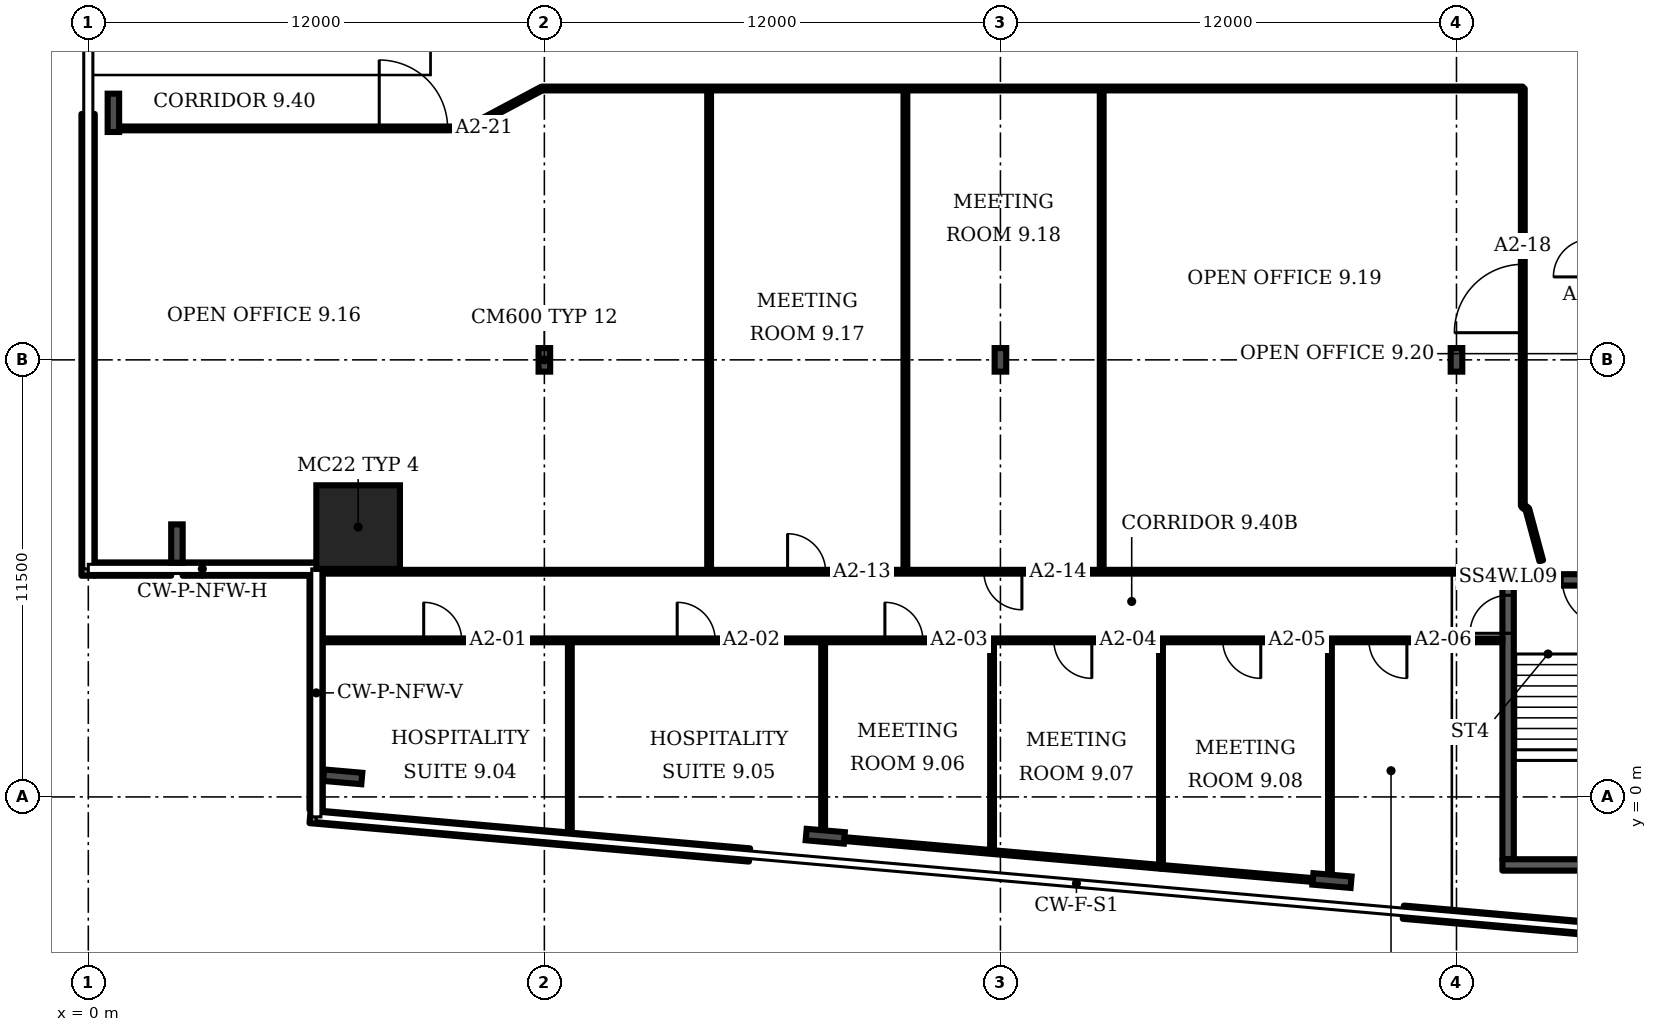
"""IFC4 building model, lengths in metres.
Left out: names, types, materials, properties, quantities, classifications, styles, units other than length and angle.
Written with IfcOpenShell. Run it as: python <this file> out.ifc"""

import sys

from ifc_helpers import new_model, si_unit, direction, frame, frame_2d, origin, origin_2d, place, context, subcontext, project, spatial, rectangle, i_section, extrude, element, fill, save


model = new_model("IFC4")
c1 = context("Model", 3, precision=1e-05, world=origin(), true_north=direction((0.0, 1.0)))
c2 = subcontext(c1, "Body", "Model", "MODEL_VIEW")
j1 = project(units=[si_unit("LENGTHUNIT", "METRE"), si_unit("PLANEANGLEUNIT", "RADIAN")], contexts=[c1])
p1 = place(None, origin())
s1 = spatial("IfcSite", under=j1, at=p1, CompositionType="ELEMENT")
p2 = place(p1, origin())
s2 = spatial("IfcBuilding", under=s1, at=p2, CompositionType="ELEMENT")
p3 = place(p2, frame((0.0, 0.0, 52.3)))
s3 = spatial("IfcBuildingStorey", under=s2, at=p3, CompositionType="ELEMENT", Elevation=52.3)
p4 = place(p3, frame((7.1, 7.1, 0.0), z_axis=(0.0, 0.0, 1.0), x_axis=(1.0, 0.0, 0.0)))
e1 = element("IfcColumn", 1, at=p4, inside=s3, PredefinedType="COLUMN", context=c2, shape_type="SweptSolid", body=[
    extrude(rectangle(XDim=2.2, YDim=2.2, at=origin_2d()), origin(), (0.0, 0.0, 1.0), 3.6),
])
for number, where, z_axis, x_axis in (
    (2, (6.694, 0.529, 0.0), (0.0, 0.0, 1.0), (-0.087, -0.996, 0.0)),
    (3, (19.391, -1.034, 0.0), (0.0, 0.0, 1.0), (-0.087, -0.996, 0.0)),
    (4, (32.724, -2.2, 0.0), (0.0, 0.0, 1.0), (-0.087, -0.996, 0.0)),
    (5, (0.66, 18.0, 0.0), (0.0, 0.0, 1.0), (-1.0, 0.0, 0.0)),
    (6, (2.332, 6.667, 0.0), (0.0, 0.0, 1.0), (-1.0, 0.0, 0.0)),
):
    element("IfcColumn", number, at=place(p3, frame(where, z_axis=z_axis, x_axis=x_axis)), inside=s3, PredefinedType="COLUMN", context=c2, shape_type="SweptSolid", body=[
        extrude(i_section(OverallWidth=0.302, OverallDepth=1.008, WebThickness=0.021, FlangeThickness=0.04, FilletRadius=0.03, at=origin_2d()), origin(), (0.0, 0.0, 1.0), 3.6),
    ])
for number, where, z_axis, x_axis in (
    (7, (12.0, 11.5, 0.0), (0.0, 0.0, 1.0), (1.0, 0.0, 0.0)),
    (8, (24.0, 11.5, 0.0), (0.0, 0.0, 1.0), (1.0, 0.0, 0.0)),
    (9, (36.0, 11.5, 0.0), (0.0, 0.0, 1.0), (1.0, 0.0, 0.0)),
):
    element("IfcColumn", number, at=place(p3, frame(where, z_axis=z_axis, x_axis=x_axis)), inside=s3, PredefinedType="COLUMN", context=c2, shape_type="SweptSolid", body=[
        extrude(i_section(OverallWidth=0.305, OverallDepth=0.62, WebThickness=0.021, FlangeThickness=0.04, FilletRadius=0.027, at=origin_2d()), origin(), (0.0, 0.0, 1.0), 3.6),
    ])
p5 = place(p3, frame((5.835, -0.516, 0.0), z_axis=(0.0, 0.0, 1.0), x_axis=(0.996192, -0.087142, 0.0)))
e10 = element("IfcWall", 10, at=p5, inside=s3, PredefinedType="SOLIDWALL", context=c2, shape_type="SweptSolid", body=[
    extrude(rectangle(XDim=11.607, YDim=0.35, at=frame_2d((5.804, 0.0))), origin(), (0.0, 0.0, 1.0), 1.0),
])
p6 = place(p3, frame((34.601, -3.032, 0.0), z_axis=(0.0, 0.0, 1.0), x_axis=(0.996193, -0.087148, 0.0)))
e11 = element("IfcWall", 11, at=p6, inside=s3, PredefinedType="SOLIDWALL", context=c2, shape_type="SweptSolid", body=[
    extrude(rectangle(XDim=11.458, YDim=0.35, at=frame_2d((5.729, 0.0))), origin(), (0.0, 0.0, 1.0), 1.0),
])
p7 = place(p3, frame((-0.005, 17.97, 0.0), z_axis=(0.0, 0.0, 1.0), x_axis=(0.0, -1.0, 0.0)))
e12 = element("IfcWall", 12, at=p7, inside=s3, PredefinedType="SOLIDWALL", context=c2, shape_type="SweptSolid", body=[
    extrude(rectangle(XDim=12.15, YDim=0.35, at=frame_2d((6.075, 0.0))), origin(), (0.0, 0.0, 1.0), 1.0),
])
p8 = place(p3, frame((0.17, 5.995, 0.0), z_axis=(0.0, 0.0, 1.0), x_axis=(1.0, 0.0, 0.0)))
e13 = element("IfcWall", 13, at=p8, inside=s3, PredefinedType="SOLIDWALL", context=c2, shape_type="SweptSolid", body=[
    extrude(rectangle(XDim=2.011, YDim=0.35, at=frame_2d((1.005, 0.0))), origin(), (0.0, 0.0, 1.0), 1.0),
])
p9 = place(p3, frame((2.483, 5.995, 0.0), z_axis=(0.0, 0.0, 1.0), x_axis=(1.0, 0.0, 0.0)))
e14 = element("IfcWall", 14, at=p9, inside=s3, PredefinedType="SOLIDWALL", context=c2, shape_type="SweptSolid", body=[
    extrude(rectangle(XDim=3.517, YDim=0.35, at=frame_2d((1.759, 0.0))), origin(), (0.0, 0.0, 1.0), 1.0),
])
p10 = place(p3, frame((5.995, 5.82, 0.0), z_axis=(0.0, 0.0, 1.0), x_axis=(0.0, -1.0, 0.0)))
e15 = element("IfcWall", 15, at=p10, inside=s3, PredefinedType="SOLIDWALL", context=c2, shape_type="SweptSolid", body=[
    extrude(rectangle(XDim=6.161, YDim=0.35, at=frame_2d((3.081, 0.0))), origin(), (0.0, 0.0, 1.0), 1.0),
])
p11 = place(p3, frame((37.208, 5.711, 0.0), z_axis=(0.0, 0.0, 1.0), x_axis=(1.0, 0.0, 0.0)))
e16 = element("IfcWall", 16, at=p11, inside=s3, PredefinedType="SHEAR", context=c2, shape_type="SweptSolid", body=[
    extrude(rectangle(XDim=4.35, YDim=0.3, at=frame_2d((2.175, 0.0))), origin(), (0.0, 0.0, 1.0), 3.2),
])
p12 = place(p11, frame((1.575, 0.0, 0.0)))
e17 = element("IfcOpeningElement", 17, at=p12, cuts=e16, PredefinedType="OPENING", context=c2, shape_type="SweptSolid", body=[
    extrude(rectangle(XDim=1.2, YDim=2.1, at=frame_2d((0.6, 1.05))), frame((0.0, 0.16, 0.0), z_axis=(0.0, -1.0, 0.0), x_axis=(1.0, 0.0, 0.0)), (0.0, 0.0, 1.0), 0.32),
])
p13 = place(p3, frame((37.358, -1.639, 0.0), z_axis=(0.0, 0.0, 1.0), x_axis=(0.0, 1.0, 0.0)))
e18 = element("IfcWall", 18, at=p13, inside=s3, PredefinedType="SHEAR", context=c2, shape_type="SweptSolid", body=[
    extrude(rectangle(XDim=7.2, YDim=0.3, at=frame_2d((3.6, 0.0))), origin(), (0.0, 0.0, 1.0), 3.2),
])
p14 = place(p13, frame((5.945, 0.0, 0.0)))
e19 = element("IfcOpeningElement", 19, at=p14, cuts=e18, PredefinedType="OPENING", context=c2, shape_type="SweptSolid", body=[
    extrude(rectangle(XDim=1.0, YDim=2.1, at=frame_2d((0.5, 1.05))), frame((0.0, 0.16, 0.0), z_axis=(0.0, -1.0, 0.0), x_axis=(1.0, 0.0, 0.0)), (0.0, 0.0, 1.0), 0.32),
])
p15 = place(p3, frame((0.63, 17.59, 0.0), z_axis=(0.0, 0.0, 1.0), x_axis=(1.0, 0.0, 0.0)))
e20 = element("IfcWall", 20, at=p15, inside=s3, PredefinedType="PARTITIONING", context=c2, shape_type="SweptSolid", body=[
    extrude(rectangle(XDim=9.55, YDim=0.1, at=frame_2d((4.775, 0.0))), origin(), (0.0, 0.0, 1.0), 3.2),
])
p16 = place(p15, frame((7.025, 0.0, 0.0)))
e21 = element("IfcOpeningElement", 21, at=p16, cuts=e20, PredefinedType="OPENING", context=c2, shape_type="SweptSolid", body=[
    extrude(rectangle(XDim=1.8, YDim=2.1, at=frame_2d((0.9, 1.05))), frame((0.0, 0.06, 0.0), z_axis=(0.0, -1.0, 0.0), x_axis=(1.0, 0.0, 0.0)), (0.0, 0.0, 1.0), 0.12),
])
p17 = place(p3, frame((6.02, 4.12, 0.0), z_axis=(0.0, 0.0, 1.0), x_axis=(1.0, 0.0, 0.0)))
e22 = element("IfcWall", 22, at=p17, inside=s3, PredefinedType="PARTITIONING", context=c2, shape_type="SweptSolid", body=[
    extrude(rectangle(XDim=31.188, YDim=0.1, at=frame_2d((15.594, 0.0))), origin(), (0.0, 0.0, 1.0), 3.2),
])
p18 = place(p17, frame((2.805, 0.0, 0.0)))
e23 = element("IfcOpeningElement", 23, at=p18, cuts=e22, PredefinedType="OPENING", context=c2, shape_type="SweptSolid", body=[
    extrude(rectangle(XDim=1.0, YDim=2.1, at=frame_2d((0.5, 1.05))), frame((0.0, 0.06, 0.0), z_axis=(0.0, -1.0, 0.0), x_axis=(1.0, 0.0, 0.0)), (0.0, 0.0, 1.0), 0.12),
])
p19 = place(p17, frame((9.475, 0.0, 0.0)))
e24 = element("IfcOpeningElement", 24, at=p19, cuts=e22, PredefinedType="OPENING", context=c2, shape_type="SweptSolid", body=[
    extrude(rectangle(XDim=1.0, YDim=2.1, at=frame_2d((0.5, 1.05))), frame((0.0, 0.06, 0.0), z_axis=(0.0, -1.0, 0.0), x_axis=(1.0, 0.0, 0.0)), (0.0, 0.0, 1.0), 0.12),
])
p20 = place(p17, frame((14.94, 0.0, 0.0)))
e25 = element("IfcOpeningElement", 25, at=p20, cuts=e22, PredefinedType="OPENING", context=c2, shape_type="SweptSolid", body=[
    extrude(rectangle(XDim=1.0, YDim=2.1, at=frame_2d((0.5, 1.05))), frame((0.0, 0.06, 0.0), z_axis=(0.0, -1.0, 0.0), x_axis=(1.0, 0.0, 0.0)), (0.0, 0.0, 1.0), 0.12),
])
p21 = place(p17, frame((19.385, 0.0, 0.0)))
e26 = element("IfcOpeningElement", 26, at=p21, cuts=e22, PredefinedType="OPENING", context=c2, shape_type="SweptSolid", body=[
    extrude(rectangle(XDim=1.0, YDim=2.1, at=frame_2d((0.5, 1.05))), frame((0.0, 0.06, 0.0), z_axis=(0.0, -1.0, 0.0), x_axis=(1.0, 0.0, 0.0)), (0.0, 0.0, 1.0), 0.12),
])
p22 = place(p17, frame((23.83, 0.0, 0.0)))
e27 = element("IfcOpeningElement", 27, at=p22, cuts=e22, PredefinedType="OPENING", context=c2, shape_type="SweptSolid", body=[
    extrude(rectangle(XDim=1.0, YDim=2.1, at=frame_2d((0.5, 1.05))), frame((0.0, 0.06, 0.0), z_axis=(0.0, -1.0, 0.0), x_axis=(1.0, 0.0, 0.0)), (0.0, 0.0, 1.0), 0.12),
])
p23 = place(p17, frame((27.675, 0.0, 0.0)))
e28 = element("IfcOpeningElement", 28, at=p23, cuts=e22, PredefinedType="OPENING", context=c2, shape_type="SweptSolid", body=[
    extrude(rectangle(XDim=1.0, YDim=2.1, at=frame_2d((0.5, 1.05))), frame((0.0, 0.06, 0.0), z_axis=(0.0, -1.0, 0.0), x_axis=(1.0, 0.0, 0.0)), (0.0, 0.0, 1.0), 0.12),
])
p24 = place(p3, frame((6.02, 5.925, 0.0), z_axis=(0.0, 0.0, 1.0), x_axis=(1.0, 0.0, 0.0)))
e29 = element("IfcWall", 29, at=p24, inside=s3, PredefinedType="PARTITIONING", context=c2, shape_type="SweptSolid", body=[
    extrude(rectangle(XDim=32.21, YDim=0.1, at=frame_2d((16.105, 0.0))), origin(), (0.0, 0.0, 1.0), 3.2),
])
p25 = place(p24, frame((12.38, 0.0, 0.0)))
e30 = element("IfcOpeningElement", 30, at=p25, cuts=e29, PredefinedType="OPENING", context=c2, shape_type="SweptSolid", body=[
    extrude(rectangle(XDim=1.0, YDim=2.1, at=frame_2d((0.5, 1.05))), frame((0.0, 0.06, 0.0), z_axis=(0.0, -1.0, 0.0), x_axis=(1.0, 0.0, 0.0)), (0.0, 0.0, 1.0), 0.12),
])
p26 = place(p24, frame((17.545, 0.0, 0.0)))
e31 = element("IfcOpeningElement", 31, at=p26, cuts=e29, PredefinedType="OPENING", context=c2, shape_type="SweptSolid", body=[
    extrude(rectangle(XDim=1.0, YDim=2.1, at=frame_2d((0.5, 1.05))), frame((0.0, 0.06, 0.0), z_axis=(0.0, -1.0, 0.0), x_axis=(1.0, 0.0, 0.0)), (0.0, 0.0, 1.0), 0.12),
])
p27 = place(p3, frame((10.18, 17.59, 0.0), z_axis=(0.0, 0.0, 1.0), x_axis=(0.435266, 0.900306, 0.0)))
e32 = element("IfcWall", 32, at=p27, inside=s3, PredefinedType="PARTITIONING", context=c2, shape_type="SweptSolid", body=[
    extrude(rectangle(XDim=0.172, YDim=0.1, at=frame_2d((0.086, 0.0))), origin(), (0.0, 0.0, 1.0), 3.2),
])
p28 = place(p3, frame((10.255, 17.745, 0.0), z_axis=(0.0, 0.0, 1.0), x_axis=(0.882644, 0.470051, 0.0)))
e33 = element("IfcWall", 33, at=p28, inside=s3, PredefinedType="PARTITIONING", context=c2, shape_type="SweptSolid", body=[
    extrude(rectangle(XDim=1.904, YDim=0.1, at=frame_2d((0.952, 0.0))), origin(), (0.0, 0.0, 1.0), 3.2),
])
p29 = place(p3, frame((11.935, 18.64, 0.0), z_axis=(0.0, 0.0, 1.0), x_axis=(1.0, 0.0, 0.0)))
e34 = element("IfcWall", 34, at=p29, inside=s3, PredefinedType="PARTITIONING", context=c2, shape_type="SweptSolid", body=[
    extrude(rectangle(XDim=25.81, YDim=0.1, at=frame_2d((12.905, 0.0))), origin(), (0.0, 0.0, 1.0), 3.2),
])
p30 = place(p3, frame((12.67, -1.088, 0.0), z_axis=(0.0, 0.0, 1.0), x_axis=(0.0, 1.0, 0.0)))
e35 = element("IfcWall", 35, at=p30, inside=s3, PredefinedType="PARTITIONING", context=c2, shape_type="SweptSolid", body=[
    extrude(rectangle(XDim=5.208, YDim=0.1, at=frame_2d((2.604, 0.0))), origin(), (0.0, 0.0, 1.0), 3.2),
])
p31 = place(p3, frame((16.335, 5.925, 0.0), z_axis=(0.0, 0.0, 1.0), x_axis=(0.0, 1.0, 0.0)))
e36 = element("IfcWall", 36, at=p31, inside=s3, PredefinedType="PARTITIONING", context=c2, shape_type="SweptSolid", body=[
    extrude(rectangle(XDim=12.715, YDim=0.1, at=frame_2d((6.357, 0.0))), origin(), (0.0, 0.0, 1.0), 3.2),
])
p32 = place(p3, frame((19.335, -1.06, 0.0), z_axis=(0.0, 0.0, 1.0), x_axis=(0.0, 1.0, 0.0)))
e37 = element("IfcWall", 37, at=p32, inside=s3, PredefinedType="PARTITIONING", context=c2, shape_type="SweptSolid", body=[
    extrude(rectangle(XDim=5.18, YDim=0.1, at=frame_2d((2.59, 0.0))), origin(), (0.0, 0.0, 1.0), 3.2),
])
p33 = place(p3, frame((21.5, 5.925, 0.0), z_axis=(0.0, 0.0, 1.0), x_axis=(0.0, 1.0, 0.0)))
e38 = element("IfcWall", 38, at=p33, inside=s3, PredefinedType="PARTITIONING", context=c2, shape_type="SweptSolid", body=[
    extrude(rectangle(XDim=12.715, YDim=0.1, at=frame_2d((6.357, 0.0))), origin(), (0.0, 0.0, 1.0), 3.2),
])
p34 = place(p3, frame((23.78, -1.45, 0.0), z_axis=(0.0, 0.0, 1.0), x_axis=(0.0, 1.0, 0.0)))
e39 = element("IfcWall", 39, at=p34, inside=s3, PredefinedType="PARTITIONING", context=c2, shape_type="SweptSolid", body=[
    extrude(rectangle(XDim=5.57, YDim=0.1, at=frame_2d((2.785, 0.0))), origin(), (0.0, 0.0, 1.0), 3.2),
])
p35 = place(p3, frame((26.665, 5.925, 0.0), z_axis=(0.0, 0.0, 1.0), x_axis=(0.0, 1.0, 0.0)))
e40 = element("IfcWall", 40, at=p35, inside=s3, PredefinedType="PARTITIONING", context=c2, shape_type="SweptSolid", body=[
    extrude(rectangle(XDim=12.715, YDim=0.1, at=frame_2d((6.357, 0.0))), origin(), (0.0, 0.0, 1.0), 3.2),
])
p36 = place(p3, frame((28.22, -1.84, 0.0), z_axis=(0.0, 0.0, 1.0), x_axis=(-0.996164, 0.087512, 0.0)))
e41 = element("IfcWall", 41, at=p36, inside=s3, PredefinedType="PARTITIONING", context=c2, shape_type="SweptSolid", body=[
    extrude(rectangle(XDim=8.919, YDim=0.1, at=frame_2d((4.459, 0.0))), origin(), (0.0, 0.0, 1.0), 2.58),
])
p37 = place(p3, frame((28.225, -1.84, 0.0), z_axis=(0.0, 0.0, 1.0), x_axis=(0.0, 1.0, 0.0)))
e42 = element("IfcWall", 42, at=p37, inside=s3, PredefinedType="PARTITIONING", context=c2, shape_type="SweptSolid", body=[
    extrude(rectangle(XDim=5.96, YDim=0.1, at=frame_2d((2.98, 0.0))), origin(), (0.0, 0.0, 1.0), 3.2),
])
p38 = place(p3, frame((32.665, -2.225, 0.0), z_axis=(0.0, 0.0, 1.0), x_axis=(-0.996263, 0.086391, 0.0)))
e43 = element("IfcWall", 43, at=p38, inside=s3, PredefinedType="PARTITIONING", context=c2, shape_type="SweptSolid", body=[
    extrude(rectangle(XDim=4.457, YDim=0.1, at=frame_2d((2.228, 0.0))), origin(), (0.0, 0.0, 1.0), 2.58),
])
p39 = place(p3, frame((32.67, -2.225, 0.0), z_axis=(0.0, 0.0, 1.0), x_axis=(0.0, 1.0, 0.0)))
e44 = element("IfcWall", 44, at=p39, inside=s3, PredefinedType="PARTITIONING", context=c2, shape_type="SweptSolid", body=[
    extrude(rectangle(XDim=6.345, YDim=0.1, at=frame_2d((3.173, 0.0))), origin(), (0.0, 0.0, 1.0), 3.2),
])
p40 = place(p3, frame((37.745, 7.66, 0.0), z_axis=(0.0, 0.0, 1.0), x_axis=(0.0, 1.0, 0.0)))
e45 = element("IfcWall", 45, at=p40, inside=s3, PredefinedType="PARTITIONING", context=c2, shape_type="SweptSolid", body=[
    extrude(rectangle(XDim=10.98, YDim=0.1, at=frame_2d((5.49, 0.0))), origin(), (0.0, 0.0, 1.0), 3.2),
])
p41 = place(p40, frame((4.555, 0.0, 0.0)))
e46 = element("IfcOpeningElement", 46, at=p41, cuts=e45, PredefinedType="OPENING", context=c2, shape_type="SweptSolid", body=[
    extrude(rectangle(XDim=1.8, YDim=2.1, at=frame_2d((0.9, 1.05))), frame((0.0, 0.06, 0.0), z_axis=(0.0, -1.0, 0.0), x_axis=(1.0, 0.0, 0.0)), (0.0, 0.0, 1.0), 0.12),
])
p42 = place(p3, frame((37.865, 7.57, 0.0), z_axis=(0.0, 0.0, 1.0), x_axis=(-0.800198, 0.599741, 0.0)))
e47 = element("IfcWall", 47, at=p42, inside=s3, PredefinedType="PARTITIONING", context=c2, shape_type="SweptSolid", body=[
    extrude(rectangle(XDim=0.15, YDim=0.1, at=frame_2d((0.075, 0.0))), origin(), (0.0, 0.0, 1.0), 3.2),
])
p43 = place(p3, frame((38.23, 6.215, 0.0), z_axis=(0.0, 0.0, 1.0), x_axis=(-0.260099, 0.965585, 0.0)))
e48 = element("IfcWall", 48, at=p43, inside=s3, PredefinedType="PARTITIONING", context=c2, shape_type="SweptSolid", body=[
    extrude(rectangle(XDim=1.403, YDim=0.1, at=frame_2d((0.702, 0.0))), origin(), (0.0, 0.0, 1.0), 3.2),
])
p44 = place(p3, frame((37.208, -1.789, 0.0), z_axis=(0.0, 0.0, 1.0), x_axis=(1.0, 0.0, 0.0)))
e49 = element("IfcWall", 49, at=p44, inside=s3, PredefinedType="SHEAR", context=c2, shape_type="SweptSolid", body=[
    extrude(rectangle(XDim=4.35, YDim=0.3, at=frame_2d((2.175, 0.0))), origin(), (0.0, 0.0, 1.0), 3.2),
])
p45 = place(p14, origin())
e50 = element("IfcDoor", 50, at=p45, inside=s3, OperationType="SINGLE_SWING_LEFT", PredefinedType="DOOR", context=c2, shape_type="SweptSolid", body=[
    extrude(rectangle(XDim=1.0, YDim=2.1, at=frame_2d((0.5, 1.05))), frame((0.0, 0.025, 0.0), z_axis=(0.0, -1.0, 0.0), x_axis=(1.0, 0.0, 0.0)), (0.0, 0.0, 1.0), 0.05),
])
fill(e19, e50)
p46 = place(p12, origin())
e51 = element("IfcDoor", 51, at=p46, inside=s3, OperationType="SINGLE_SWING_RIGHT", PredefinedType="DOOR", context=c2, shape_type="SweptSolid", body=[
    extrude(rectangle(XDim=1.2, YDim=2.1, at=frame_2d((0.6, 1.05))), frame((0.0, 0.025, 0.0), z_axis=(0.0, -1.0, 0.0), x_axis=(1.0, 0.0, 0.0)), (0.0, 0.0, 1.0), 0.05),
])
fill(e17, e51)
p47 = place(p18, origin())
e52 = element("IfcDoor", 52, at=p47, inside=s3, OperationType="SINGLE_SWING_LEFT", PredefinedType="DOOR", context=c2, shape_type="SweptSolid", body=[
    extrude(rectangle(XDim=1.0, YDim=2.1, at=frame_2d((0.5, 1.05))), frame((0.0, 0.025, 0.0), z_axis=(0.0, -1.0, 0.0), x_axis=(1.0, 0.0, 0.0)), (0.0, 0.0, 1.0), 0.05),
])
fill(e23, e52)
p48 = place(p19, origin())
e53 = element("IfcDoor", 53, at=p48, inside=s3, OperationType="SINGLE_SWING_LEFT", PredefinedType="DOOR", context=c2, shape_type="SweptSolid", body=[
    extrude(rectangle(XDim=1.0, YDim=2.1, at=frame_2d((0.5, 1.05))), frame((0.0, 0.025, 0.0), z_axis=(0.0, -1.0, 0.0), x_axis=(1.0, 0.0, 0.0)), (0.0, 0.0, 1.0), 0.05),
])
fill(e24, e53)
p49 = place(p20, origin())
e54 = element("IfcDoor", 54, at=p49, inside=s3, OperationType="SINGLE_SWING_LEFT", PredefinedType="DOOR", context=c2, shape_type="SweptSolid", body=[
    extrude(rectangle(XDim=1.0, YDim=2.1, at=frame_2d((0.5, 1.05))), frame((0.0, 0.025, 0.0), z_axis=(0.0, -1.0, 0.0), x_axis=(1.0, 0.0, 0.0)), (0.0, 0.0, 1.0), 0.05),
])
fill(e25, e54)
p50 = place(p21, origin())
e55 = element("IfcDoor", 55, at=p50, inside=s3, OperationType="SINGLE_SWING_RIGHT", PredefinedType="DOOR", context=c2, shape_type="SweptSolid", body=[
    extrude(rectangle(XDim=1.0, YDim=2.1, at=frame_2d((0.5, 1.05))), frame((0.0, 0.025, 0.0), z_axis=(0.0, -1.0, 0.0), x_axis=(1.0, 0.0, 0.0)), (0.0, 0.0, 1.0), 0.05),
])
fill(e26, e55)
p51 = place(p22, origin())
e56 = element("IfcDoor", 56, at=p51, inside=s3, OperationType="SINGLE_SWING_RIGHT", PredefinedType="DOOR", context=c2, shape_type="SweptSolid", body=[
    extrude(rectangle(XDim=1.0, YDim=2.1, at=frame_2d((0.5, 1.05))), frame((0.0, 0.025, 0.0), z_axis=(0.0, -1.0, 0.0), x_axis=(1.0, 0.0, 0.0)), (0.0, 0.0, 1.0), 0.05),
])
fill(e27, e56)
p52 = place(p23, origin())
e57 = element("IfcDoor", 57, at=p52, inside=s3, OperationType="SINGLE_SWING_RIGHT", PredefinedType="DOOR", context=c2, shape_type="SweptSolid", body=[
    extrude(rectangle(XDim=1.0, YDim=2.1, at=frame_2d((0.5, 1.05))), frame((0.0, 0.025, 0.0), z_axis=(0.0, -1.0, 0.0), x_axis=(1.0, 0.0, 0.0)), (0.0, 0.0, 1.0), 0.05),
])
fill(e28, e57)
p53 = place(p25, origin())
e58 = element("IfcDoor", 58, at=p53, inside=s3, OperationType="SINGLE_SWING_LEFT", PredefinedType="DOOR", context=c2, shape_type="SweptSolid", body=[
    extrude(rectangle(XDim=1.0, YDim=2.1, at=frame_2d((0.5, 1.05))), frame((0.0, 0.025, 0.0), z_axis=(0.0, -1.0, 0.0), x_axis=(1.0, 0.0, 0.0)), (0.0, 0.0, 1.0), 0.05),
])
fill(e30, e58)
p54 = place(p26, origin())
e59 = element("IfcDoor", 59, at=p54, inside=s3, OperationType="SINGLE_SWING_RIGHT", PredefinedType="DOOR", context=c2, shape_type="SweptSolid", body=[
    extrude(rectangle(XDim=1.0, YDim=2.1, at=frame_2d((0.5, 1.05))), frame((0.0, 0.025, 0.0), z_axis=(0.0, -1.0, 0.0), x_axis=(1.0, 0.0, 0.0)), (0.0, 0.0, 1.0), 0.05),
])
fill(e31, e59)
p55 = place(p41, origin())
e60 = element("IfcDoor", 60, at=p55, inside=s3, OperationType="DOUBLE_DOOR_SINGLE_SWING", PredefinedType="DOOR", context=c2, shape_type="SweptSolid", body=[
    extrude(rectangle(XDim=1.8, YDim=2.1, at=frame_2d((0.9, 1.05))), frame((0.0, 0.025, 0.0), z_axis=(0.0, -1.0, 0.0), x_axis=(1.0, 0.0, 0.0)), (0.0, 0.0, 1.0), 0.05),
])
fill(e46, e60)
p56 = place(p16, origin())
e61 = element("IfcDoor", 61, at=p56, inside=s3, OperationType="DOUBLE_DOOR_SINGLE_SWING", PredefinedType="DOOR", context=c2, shape_type="SweptSolid", body=[
    extrude(rectangle(XDim=1.8, YDim=2.1, at=frame_2d((0.9, 1.05))), frame((0.0, 0.025, 0.0), z_axis=(0.0, -1.0, 0.0), x_axis=(1.0, 0.0, 0.0)), (0.0, 0.0, 1.0), 0.05),
])
fill(e21, e61)
save(model, sys.argv[1])
